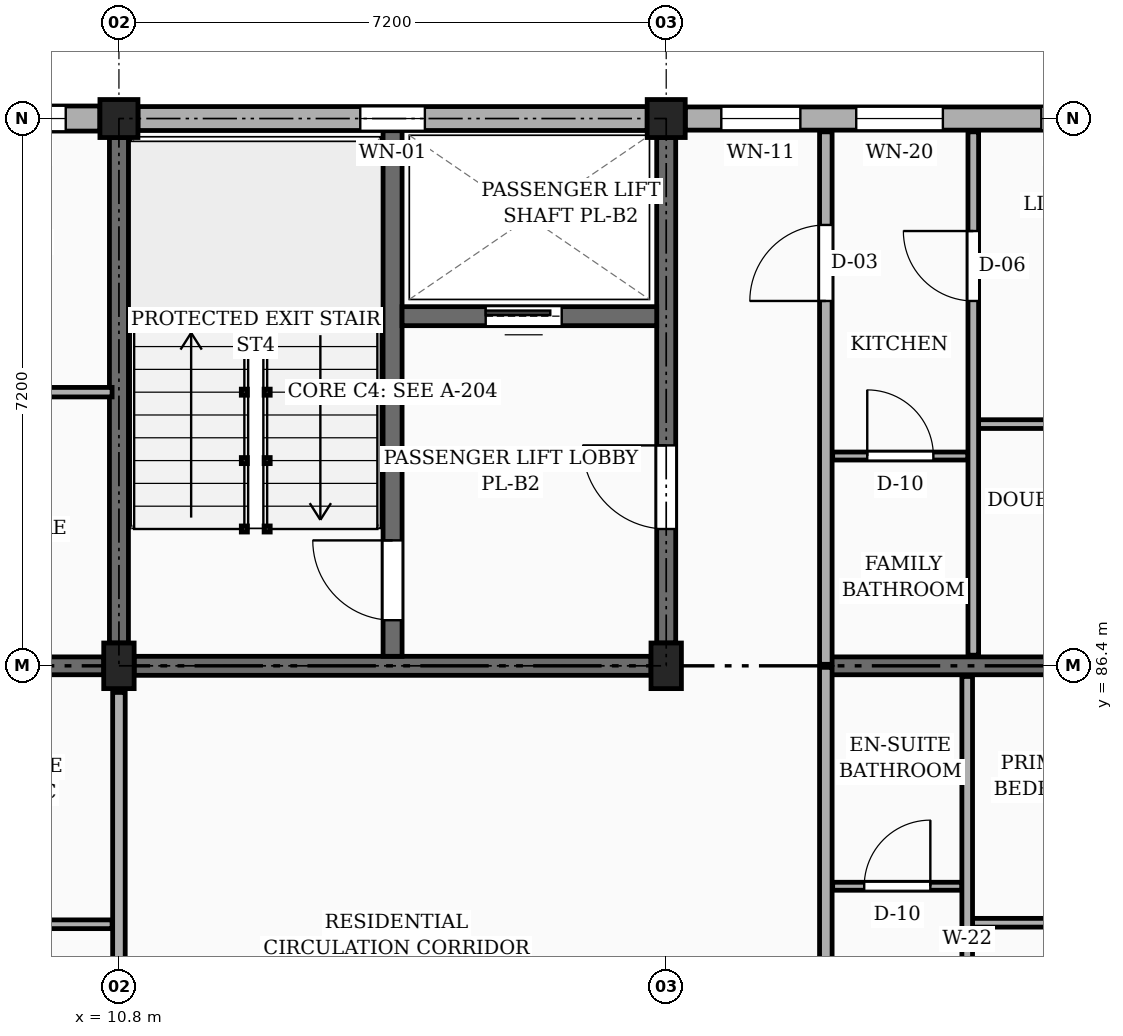
"""IFC4 building model, lengths in metres.
Left out: names, types, materials, properties, quantities, classifications, styles, units other than length and angle.
Written with IfcOpenShell. Run it as: python <this file> out.ifc"""

import sys

from ifc_helpers import new_model, si_unit, direction, frame, frame_2d, origin, origin_2d, place, context, subcontext, project, spatial, rectangle, extrude, element, fill, save


model = new_model("IFC4")
c1 = context("Model", 3, precision=1e-05, world=origin(), true_north=direction((0.0, 1.0)))
c2 = subcontext(c1, "Body", "Model", "MODEL_VIEW")
j1 = project(units=[si_unit("LENGTHUNIT", "METRE"), si_unit("PLANEANGLEUNIT", "RADIAN")], contexts=[c1])
p1 = place(None, origin())
s1 = spatial("IfcSite", under=j1, at=p1, CompositionType="ELEMENT")
p2 = place(p1, origin())
s2 = spatial("IfcBuilding", under=s1, at=p2, CompositionType="ELEMENT")
p3 = place(p2, frame((0.0, 0.0, 23.4)))
s3 = spatial("IfcBuildingStorey", under=s2, at=p3, CompositionType="ELEMENT", Elevation=23.4)
p4 = place(p3, frame((10.8, 86.4, 0.0), z_axis=(0.0, 0.0, 1.0), x_axis=(1.0, 0.0, 0.0)))
e1 = element("IfcColumn", 1, at=p4, inside=s3, PredefinedType="COLUMN", context=c2, shape_type="SweptSolid", body=[
    extrude(rectangle(XDim=0.4, YDim=0.6, at=origin_2d()), origin(), (0.0, 0.0, 1.0), 3.15),
])
p5 = place(p3, frame((10.8, 93.6, 0.0), z_axis=(0.0, 0.0, 1.0), x_axis=(1.0, 0.0, 0.0)))
e2 = element("IfcColumn", 2, at=p5, inside=s3, PredefinedType="COLUMN", context=c2, shape_type="SweptSolid", body=[
    extrude(rectangle(XDim=0.5, YDim=0.5, at=origin_2d()), origin(), (0.0, 0.0, 1.0), 3.15),
])
p6 = place(p3, frame((18.0, 86.4, 0.0), z_axis=(0.0, 0.0, 1.0), x_axis=(1.0, 0.0, 0.0)))
e3 = element("IfcColumn", 3, at=p6, inside=s3, PredefinedType="COLUMN", context=c2, shape_type="SweptSolid", body=[
    extrude(rectangle(XDim=0.4, YDim=0.6, at=origin_2d()), origin(), (0.0, 0.0, 1.0), 3.15),
])
p7 = place(p3, frame((18.0, 93.6, 0.0), z_axis=(0.0, 0.0, 1.0), x_axis=(1.0, 0.0, 0.0)))
e4 = element("IfcColumn", 4, at=p7, inside=s3, PredefinedType="COLUMN", context=c2, shape_type="SweptSolid", body=[
    extrude(rectangle(XDim=0.5, YDim=0.5, at=origin_2d()), origin(), (0.0, 0.0, 1.0), 3.15),
])
p8 = place(p3, frame((3.85, 86.4, 0.0), z_axis=(0.0, 0.0, 1.0), x_axis=(1.0, 0.0, 0.0)))
e5 = element("IfcWall", 5, at=p8, inside=s3, PredefinedType="SOLIDWALL", context=c2, shape_type="SweptSolid", body=[
    extrude(rectangle(XDim=6.75, YDim=0.235, at=frame_2d((3.375, 0.0))), origin(), (0.0, 0.0, 1.0), 2.21),
])
p9 = place(p8, frame((1.35, 0.0, 0.0)))
e6 = element("IfcOpeningElement", 6, at=p9, cuts=e5, PredefinedType="OPENING", context=c2, shape_type="SweptSolid", body=[
    extrude(rectangle(XDim=0.98, YDim=2.12, at=frame_2d((0.49, 1.06))), frame((0.0, 0.127, 0.0), z_axis=(0.0, -1.0, 0.0), x_axis=(1.0, 0.0, 0.0)), (0.0, 0.0, 1.0), 0.255),
])
p10 = place(p3, frame((20.1, 86.4, 0.0), z_axis=(0.0, 0.0, 1.0), x_axis=(1.0, 0.0, 0.0)))
e7 = element("IfcWall", 7, at=p10, inside=s3, PredefinedType="SOLIDWALL", context=c2, shape_type="SweptSolid", body=[
    extrude(rectangle(XDim=4.85, YDim=0.235, at=frame_2d((2.425, 0.0))), origin(), (0.0, 0.0, 1.0), 2.21),
])
p11 = place(p3, frame((24.95, 93.6, 0.0), z_axis=(0.0, 0.0, 1.0), x_axis=(-1.0, 0.0, 0.0)))
e8 = element("IfcWall", 8, at=p11, inside=s3, PredefinedType="SOLIDWALL", context=c2, shape_type="SweptSolid", body=[
    extrude(rectangle(XDim=6.7, YDim=0.305, at=frame_2d((3.35, 0.0))), origin(), (0.0, 0.0, 1.0), 2.48),
])
p12 = place(p11, frame((1.035, 0.0, 0.78)))
e9 = element("IfcOpeningElement", 9, at=p12, cuts=e8, PredefinedType="OPENING", context=c2, shape_type="SweptSolid", body=[
    extrude(rectangle(XDim=0.98, YDim=1.36, at=frame_2d((0.49, 0.68))), frame((0.0, 0.163, 0.0), z_axis=(0.0, -1.0, 0.0), x_axis=(1.0, 0.0, 0.0)), (0.0, 0.0, 1.0), 0.325),
])
p13 = place(p11, frame((3.31, 0.0, 0.78)))
e10 = element("IfcOpeningElement", 10, at=p13, cuts=e8, PredefinedType="OPENING", context=c2, shape_type="SweptSolid", body=[
    extrude(rectangle(XDim=1.14, YDim=1.36, at=frame_2d((0.57, 0.68))), frame((0.0, 0.163, 0.0), z_axis=(0.0, -1.0, 0.0), x_axis=(1.0, 0.0, 0.0)), (0.0, 0.0, 1.0), 0.325),
])
p14 = place(p11, frame((5.185, 0.0, 0.78)))
e11 = element("IfcOpeningElement", 11, at=p14, cuts=e8, PredefinedType="OPENING", context=c2, shape_type="SweptSolid", body=[
    extrude(rectangle(XDim=1.04, YDim=1.26, at=frame_2d((0.52, 0.63))), frame((0.0, 0.163, 0.0), z_axis=(0.0, -1.0, 0.0), x_axis=(1.0, 0.0, 0.0)), (0.0, 0.0, 1.0), 0.325),
])
p15 = place(p3, frame((17.75, 93.6, 0.0), z_axis=(0.0, 0.0, 1.0), x_axis=(-1.0, 0.0, 0.0)))
e12 = element("IfcWall", 12, at=p15, inside=s3, PredefinedType="SOLIDWALL", context=c2, shape_type="SweptSolid", body=[
    extrude(rectangle(XDim=6.7, YDim=0.315, at=frame_2d((3.35, 0.0))), origin(), (0.0, 0.0, 1.0), 2.48),
])
p16 = place(p15, frame((2.925, 0.0, 0.9)))
e13 = element("IfcOpeningElement", 13, at=p16, cuts=e12, PredefinedType="OPENING", context=c2, shape_type="SweptSolid", body=[
    extrude(rectangle(XDim=0.85, YDim=1.15, at=frame_2d((0.425, 0.575))), frame((0.0, 0.167, 0.0), z_axis=(0.0, -1.0, 0.0), x_axis=(1.0, 0.0, 0.0)), (0.0, 0.0, 1.0), 0.335),
])
p17 = place(p3, frame((10.55, 93.6, 0.0), z_axis=(0.0, 0.0, 1.0), x_axis=(-1.0, 0.0, 0.0)))
e14 = element("IfcWall", 14, at=p17, inside=s3, PredefinedType="SOLIDWALL", context=c2, shape_type="SweptSolid", body=[
    extrude(rectangle(XDim=6.7, YDim=0.33, at=frame_2d((3.35, 0.0))), origin(), (0.0, 0.0, 1.0), 2.48),
])
p18 = place(p17, frame((0.45, 0.0, 0.78)))
e15 = element("IfcOpeningElement", 15, at=p18, cuts=e14, PredefinedType="OPENING", context=c2, shape_type="SweptSolid", body=[
    extrude(rectangle(XDim=1.3, YDim=1.36, at=frame_2d((0.65, 0.68))), frame((0.0, 0.175, 0.0), z_axis=(0.0, -1.0, 0.0), x_axis=(1.0, 0.0, 0.0)), (0.0, 0.0, 1.0), 0.35),
])
p19 = place(p17, frame((4.65, 0.0, 0.78)))
e16 = element("IfcOpeningElement", 16, at=p19, cuts=e14, PredefinedType="OPENING", context=c2, shape_type="SweptSolid", body=[
    extrude(rectangle(XDim=1.46, YDim=1.36, at=frame_2d((0.73, 0.68))), frame((0.0, 0.175, 0.0), z_axis=(0.0, -1.0, 0.0), x_axis=(1.0, 0.0, 0.0)), (0.0, 0.0, 1.0), 0.35),
])
p20 = place(p3, frame((10.8, 86.7, 0.0), z_axis=(0.0, 0.0, 1.0), x_axis=(0.0, 1.0, 0.0)))
e17 = element("IfcWall", 17, at=p20, inside=s3, PredefinedType="SHEAR", context=c2, shape_type="SweptSolid", body=[
    extrude(rectangle(XDim=6.65, YDim=0.25, at=frame_2d((3.325, 0.0))), origin(), (0.0, 0.0, 1.0), 2.91),
])
p21 = place(p3, frame((18.0, 86.7, 0.0), z_axis=(0.0, 0.0, 1.0), x_axis=(0.0, 1.0, 0.0)))
e18 = element("IfcWall", 18, at=p21, inside=s3, PredefinedType="SHEAR", context=c2, shape_type="SweptSolid", body=[
    extrude(rectangle(XDim=6.65, YDim=0.25, at=frame_2d((3.325, 0.0))), origin(), (0.0, 0.0, 1.0), 2.91),
])
p22 = place(p21, frame((1.5, 0.0, 0.0)))
e19 = element("IfcOpeningElement", 19, at=p22, cuts=e18, PredefinedType="OPENING", context=c2, shape_type="SweptSolid", body=[
    extrude(rectangle(XDim=1.1, YDim=2.15, at=frame_2d((0.55, 1.075))), frame((0.0, 0.135, 0.0), z_axis=(0.0, -1.0, 0.0), x_axis=(1.0, 0.0, 0.0)), (0.0, 0.0, 1.0), 0.27),
])
p23 = place(p3, frame((11.0, 86.4, 0.0), z_axis=(0.0, 0.0, 1.0), x_axis=(1.0, 0.0, 0.0)))
e20 = element("IfcWall", 20, at=p23, inside=s3, PredefinedType="SHEAR", context=c2, shape_type="SweptSolid", body=[
    extrude(rectangle(XDim=6.8, YDim=0.25, at=frame_2d((3.4, 0.0))), origin(), (0.0, 0.0, 1.0), 2.91),
])
p24 = place(p3, frame((14.4, 86.525, 0.0), z_axis=(0.0, 0.0, 1.0), x_axis=(0.0, 1.0, 0.0)))
e21 = element("IfcWall", 21, at=p24, inside=s3, PredefinedType="SHEAR", context=c2, shape_type="SweptSolid", body=[
    extrude(rectangle(XDim=6.915, YDim=0.25, at=frame_2d((3.458, 0.0))), origin(), (0.0, 0.0, 1.0), 2.91),
])
p25 = place(p24, frame((0.475, 0.0, 0.0)))
e22 = element("IfcOpeningElement", 22, at=p25, cuts=e21, PredefinedType="OPENING", context=c2, shape_type="SweptSolid", body=[
    extrude(rectangle(XDim=1.05, YDim=2.15, at=frame_2d((0.525, 1.075))), frame((0.0, 0.135, 0.0), z_axis=(0.0, -1.0, 0.0), x_axis=(1.0, 0.0, 0.0)), (0.0, 0.0, 1.0), 0.27),
])
p26 = place(p3, frame((14.525, 91.0, 0.0), z_axis=(0.0, 0.0, 1.0), x_axis=(1.0, 0.0, 0.0)))
e23 = element("IfcWall", 23, at=p26, inside=s3, PredefinedType="SHEAR", context=c2, shape_type="SweptSolid", body=[
    extrude(rectangle(XDim=3.35, YDim=0.25, at=frame_2d((1.675, 0.0))), origin(), (0.0, 0.0, 1.0), 2.91),
])
p27 = place(p26, frame((1.1, 0.0, 0.0)))
e24 = element("IfcOpeningElement", 24, at=p27, cuts=e23, PredefinedType="OPENING", context=c2, shape_type="SweptSolid", body=[
    extrude(rectangle(XDim=1.0, YDim=2.2, at=frame_2d((0.5, 1.1))), frame((0.0, 0.135, 0.0), z_axis=(0.0, -1.0, 0.0), x_axis=(1.0, 0.0, 0.0)), (0.0, 0.0, 1.0), 0.27),
])
p28 = place(p3, frame((20.1, 79.22, 0.0), z_axis=(0.0, 0.0, 1.0), x_axis=(0.0, 1.0, 0.0)))
e25 = element("IfcWall", 25, at=p28, inside=s3, PredefinedType="PARTITIONING", context=c2, shape_type="SweptSolid", body=[
    extrude(rectangle(XDim=7.16, YDim=0.165, at=frame_2d((3.58, 0.0))), origin(), (0.0, 0.0, 1.0), 2.345),
])
p29 = place(p28, frame((1.33, 0.0, 0.0)))
e26 = element("IfcOpeningElement", 26, at=p29, cuts=e25, PredefinedType="OPENING", context=c2, shape_type="SweptSolid", body=[
    extrude(rectangle(XDim=1.14, YDim=2.18, at=frame_2d((0.57, 1.09))), frame((0.0, 0.093, 0.0), z_axis=(0.0, -1.0, 0.0), x_axis=(1.0, 0.0, 0.0)), (0.0, 0.0, 1.0), 0.185),
])
p30 = place(p3, frame((20.1, 86.42, 0.0), z_axis=(0.0, 0.0, 1.0), x_axis=(0.0, 1.0, 0.0)))
e27 = element("IfcWall", 27, at=p30, inside=s3, PredefinedType="PARTITIONING", context=c2, shape_type="SweptSolid", body=[
    extrude(rectangle(XDim=7.005, YDim=0.165, at=frame_2d((3.502, 0.0))), origin(), (0.0, 0.0, 1.0), 2.345),
])
p31 = place(p30, frame((4.78, 0.0, 0.0)))
e28 = element("IfcOpeningElement", 28, at=p31, cuts=e27, PredefinedType="OPENING", context=c2, shape_type="SweptSolid", body=[
    extrude(rectangle(XDim=1.0, YDim=2.15, at=frame_2d((0.5, 1.075))), frame((0.0, 0.093, 0.0), z_axis=(0.0, -1.0, 0.0), x_axis=(1.0, 0.0, 0.0)), (0.0, 0.0, 1.0), 0.185),
])
p32 = place(p3, frame((10.8, 79.55, 0.0), z_axis=(0.0, 0.0, 1.0), x_axis=(0.0, 1.0, 0.0)))
e29 = element("IfcWall", 29, at=p32, inside=s3, PredefinedType="PARTITIONING", context=c2, shape_type="SweptSolid", body=[
    extrude(rectangle(XDim=6.5, YDim=0.165, at=frame_2d((3.25, 0.0))), origin(), (0.0, 0.0, 1.0), 2.345),
])
p33 = place(p32, frame((1.1, 0.0, 0.0)))
e30 = element("IfcOpeningElement", 30, at=p33, cuts=e29, PredefinedType="OPENING", context=c2, shape_type="SweptSolid", body=[
    extrude(rectangle(XDim=1.14, YDim=2.18, at=frame_2d((0.57, 1.09))), frame((0.0, 0.093, 0.0), z_axis=(0.0, -1.0, 0.0), x_axis=(1.0, 0.0, 0.0)), (0.0, 0.0, 1.0), 0.185),
])
p34 = place(p3, frame((3.775, 83.0, 0.0), z_axis=(0.0, 0.0, 1.0), x_axis=(1.0, 0.0, 0.0)))
e31 = element("IfcWall", 31, at=p34, inside=s3, PredefinedType="PARTITIONING", context=c2, shape_type="SweptSolid", body=[
    extrude(rectangle(XDim=6.935, YDim=0.115, at=frame_2d((3.468, 0.0))), origin(), (0.0, 0.0, 1.0), 2.345),
])
p35 = place(p34, frame((4.6, 0.0, 0.0)))
e32 = element("IfcOpeningElement", 32, at=p35, cuts=e31, PredefinedType="OPENING", context=c2, shape_type="SweptSolid", body=[
    extrude(rectangle(XDim=0.87, YDim=2.05, at=frame_2d((0.435, 1.025))), frame((0.0, 0.067, 0.0), z_axis=(0.0, -1.0, 0.0), x_axis=(1.0, 0.0, 0.0)), (0.0, 0.0, 1.0), 0.135),
])
p36 = place(p34, frame((1.2, 0.0, 0.0)))
e33 = element("IfcOpeningElement", 33, at=p36, cuts=e31, PredefinedType="OPENING", context=c2, shape_type="SweptSolid", body=[
    extrude(rectangle(XDim=0.92, YDim=2.1, at=frame_2d((0.46, 1.05))), frame((0.0, 0.067, 0.0), z_axis=(0.0, -1.0, 0.0), x_axis=(1.0, 0.0, 0.0)), (0.0, 0.0, 1.0), 0.135),
])
p37 = place(p3, frame((22.03, 83.02, 0.0), z_axis=(0.0, 0.0, 1.0), x_axis=(1.0, 0.0, 0.0)))
e34 = element("IfcWall", 34, at=p37, inside=s3, PredefinedType="PARTITIONING", context=c2, shape_type="SweptSolid", body=[
    extrude(rectangle(XDim=2.995, YDim=0.115, at=frame_2d((1.498, 0.0))), origin(), (0.0, 0.0, 1.0), 2.345),
])
p38 = place(p37, frame((1.048, 0.0, 0.0)))
e35 = element("IfcOpeningElement", 35, at=p38, cuts=e34, PredefinedType="OPENING", context=c2, shape_type="SweptSolid", body=[
    extrude(rectangle(XDim=0.9, YDim=2.1, at=frame_2d((0.45, 1.05))), frame((0.0, 0.067, 0.0), z_axis=(0.0, -1.0, 0.0), x_axis=(1.0, 0.0, 0.0)), (0.0, 0.0, 1.0), 0.135),
])
p39 = place(p3, frame((20.19, 83.5, 0.0), z_axis=(0.0, 0.0, 1.0), x_axis=(1.0, 0.0, 0.0)))
e36 = element("IfcWall", 36, at=p39, inside=s3, PredefinedType="PARTITIONING", context=c2, shape_type="SweptSolid", body=[
    extrude(rectangle(XDim=1.7, YDim=0.105, at=frame_2d((0.85, 0.0))), origin(), (0.0, 0.0, 1.0), 2.345),
])
p40 = place(p39, frame((0.415, 0.0, 0.0)))
e37 = element("IfcOpeningElement", 37, at=p40, cuts=e36, PredefinedType="OPENING", context=c2, shape_type="SweptSolid", body=[
    extrude(rectangle(XDim=0.87, YDim=2.05, at=frame_2d((0.435, 1.025))), frame((0.0, 0.062, 0.0), z_axis=(0.0, -1.0, 0.0), x_axis=(1.0, 0.0, 0.0)), (0.0, 0.0, 1.0), 0.125),
])
p41 = place(p3, frame((21.96, 79.34, 0.0), z_axis=(0.0, 0.0, 1.0), x_axis=(0.0, 1.0, 0.0)))
e38 = element("IfcWall", 38, at=p41, inside=s3, PredefinedType="PARTITIONING", context=c2, shape_type="SweptSolid", body=[
    extrude(rectangle(XDim=6.92, YDim=0.14, at=frame_2d((3.46, 0.0))), origin(), (0.0, 0.0, 1.0), 2.345),
])
p42 = place(p41, frame((1.31, 0.0, 0.0)))
e39 = element("IfcOpeningElement", 39, at=p42, cuts=e38, PredefinedType="OPENING", context=c2, shape_type="SweptSolid", body=[
    extrude(rectangle(XDim=0.95, YDim=2.1, at=frame_2d((0.475, 1.05))), frame((0.0, 0.08, 0.0), z_axis=(0.0, -1.0, 0.0), x_axis=(1.0, 0.0, 0.0)), (0.0, 0.0, 1.0), 0.16),
])
p43 = place(p3, frame((3.775, 90.0, 0.0), z_axis=(0.0, 0.0, 1.0), x_axis=(1.0, 0.0, 0.0)))
e40 = element("IfcWall", 40, at=p43, inside=s3, PredefinedType="PARTITIONING", context=c2, shape_type="SweptSolid", body=[
    extrude(rectangle(XDim=6.935, YDim=0.125, at=frame_2d((3.468, 0.0))), origin(), (0.0, 0.0, 1.0), 2.345),
])
p44 = place(p43, frame((2.6, 0.0, 0.0)))
e41 = element("IfcOpeningElement", 41, at=p44, cuts=e40, PredefinedType="OPENING", context=c2, shape_type="SweptSolid", body=[
    extrude(rectangle(XDim=0.92, YDim=2.1, at=frame_2d((0.46, 1.05))), frame((0.0, 0.073, 0.0), z_axis=(0.0, -1.0, 0.0), x_axis=(1.0, 0.0, 0.0)), (0.0, 0.0, 1.0), 0.145),
])
p45 = place(p3, frame((22.11, 89.58, 0.0), z_axis=(0.0, 0.0, 1.0), x_axis=(1.0, 0.0, 0.0)))
e42 = element("IfcWall", 42, at=p45, inside=s3, PredefinedType="PARTITIONING", context=c2, shape_type="SweptSolid", body=[
    extrude(rectangle(XDim=2.915, YDim=0.115, at=frame_2d((1.458, 0.0))), origin(), (0.0, 0.0, 1.0), 2.345),
])
p46 = place(p45, frame((1.018, 0.0, 0.0)))
e43 = element("IfcOpeningElement", 43, at=p46, cuts=e42, PredefinedType="OPENING", context=c2, shape_type="SweptSolid", body=[
    extrude(rectangle(XDim=0.88, YDim=2.08, at=frame_2d((0.44, 1.04))), frame((0.0, 0.067, 0.0), z_axis=(0.0, -1.0, 0.0), x_axis=(1.0, 0.0, 0.0)), (0.0, 0.0, 1.0), 0.135),
])
p47 = place(p3, frame((20.19, 89.16, 0.0), z_axis=(0.0, 0.0, 1.0), x_axis=(1.0, 0.0, 0.0)))
e44 = element("IfcWall", 44, at=p47, inside=s3, PredefinedType="PARTITIONING", context=c2, shape_type="SweptSolid", body=[
    extrude(rectangle(XDim=1.78, YDim=0.105, at=frame_2d((0.89, 0.0))), origin(), (0.0, 0.0, 1.0), 2.345),
])
p48 = place(p47, frame((0.455, 0.0, 0.0)))
e45 = element("IfcOpeningElement", 45, at=p48, cuts=e44, PredefinedType="OPENING", context=c2, shape_type="SweptSolid", body=[
    extrude(rectangle(XDim=0.87, YDim=2.05, at=frame_2d((0.435, 1.025))), frame((0.0, 0.062, 0.0), z_axis=(0.0, -1.0, 0.0), x_axis=(1.0, 0.0, 0.0)), (0.0, 0.0, 1.0), 0.125),
])
p49 = place(p3, frame((22.04, 86.54, 0.0), z_axis=(0.0, 0.0, 1.0), x_axis=(0.0, 1.0, 0.0)))
e46 = element("IfcWall", 46, at=p49, inside=s3, PredefinedType="PARTITIONING", context=c2, shape_type="SweptSolid", body=[
    extrude(rectangle(XDim=6.885, YDim=0.14, at=frame_2d((3.442, 0.0))), origin(), (0.0, 0.0, 1.0), 2.345),
])
p50 = place(p49, frame((4.66, 0.0, 0.0)))
e47 = element("IfcOpeningElement", 47, at=p50, cuts=e46, PredefinedType="OPENING", context=c2, shape_type="SweptSolid", body=[
    extrude(rectangle(XDim=0.92, YDim=2.1, at=frame_2d((0.46, 1.05))), frame((0.0, 0.08, 0.0), z_axis=(0.0, -1.0, 0.0), x_axis=(1.0, 0.0, 0.0)), (0.0, 0.0, 1.0), 0.16),
])
p51 = place(p12, origin())
e48 = element("IfcWindow", 48, at=p51, inside=s3, PartitioningType="SINGLE_PANEL", PredefinedType="WINDOW", context=c2, shape_type="SweptSolid", body=[
    extrude(rectangle(XDim=0.98, YDim=1.36, at=frame_2d((0.49, 0.68))), frame((0.0, 0.03, 0.0), z_axis=(0.0, -1.0, 0.0), x_axis=(1.0, 0.0, 0.0)), (0.0, 0.0, 1.0), 0.06),
])
fill(e9, e48)
p52 = place(p13, origin())
e49 = element("IfcWindow", 49, at=p52, inside=s3, PartitioningType="SINGLE_PANEL", PredefinedType="WINDOW", context=c2, shape_type="SweptSolid", body=[
    extrude(rectangle(XDim=1.14, YDim=1.36, at=frame_2d((0.57, 0.68))), frame((0.0, 0.03, 0.0), z_axis=(0.0, -1.0, 0.0), x_axis=(1.0, 0.0, 0.0)), (0.0, 0.0, 1.0), 0.06),
])
fill(e10, e49)
p53 = place(p14, origin())
e50 = element("IfcWindow", 50, at=p53, inside=s3, PartitioningType="SINGLE_PANEL", PredefinedType="WINDOW", context=c2, shape_type="SweptSolid", body=[
    extrude(rectangle(XDim=1.04, YDim=1.26, at=frame_2d((0.52, 0.63))), frame((0.0, 0.03, 0.0), z_axis=(0.0, -1.0, 0.0), x_axis=(1.0, 0.0, 0.0)), (0.0, 0.0, 1.0), 0.06),
])
fill(e11, e50)
p54 = place(p16, origin())
e51 = element("IfcWindow", 51, at=p54, inside=s3, PartitioningType="SINGLE_PANEL", PredefinedType="WINDOW", context=c2, shape_type="SweptSolid", body=[
    extrude(rectangle(XDim=0.85, YDim=1.15, at=frame_2d((0.425, 0.575))), frame((0.0, 0.03, 0.0), z_axis=(0.0, -1.0, 0.0), x_axis=(1.0, 0.0, 0.0)), (0.0, 0.0, 1.0), 0.06),
])
fill(e13, e51)
p55 = place(p18, origin())
e52 = element("IfcWindow", 52, at=p55, inside=s3, PartitioningType="SINGLE_PANEL", PredefinedType="WINDOW", context=c2, shape_type="SweptSolid", body=[
    extrude(rectangle(XDim=1.3, YDim=1.36, at=frame_2d((0.65, 0.68))), frame((0.0, 0.03, 0.0), z_axis=(0.0, -1.0, 0.0), x_axis=(1.0, 0.0, 0.0)), (0.0, 0.0, 1.0), 0.06),
])
fill(e15, e52)
p56 = place(p22, frame((1.1, 0.0, 0.0), z_axis=(0.0, 0.0, 1.0), x_axis=(-1.0, 0.0, 0.0)))
e53 = element("IfcDoor", 53, at=p56, inside=s3, OperationType="SINGLE_SWING_RIGHT", PredefinedType="DOOR", context=c2, shape_type="SweptSolid", body=[
    extrude(rectangle(XDim=1.1, YDim=2.15, at=frame_2d((0.55, 1.075))), frame((0.0, 0.025, 0.0), z_axis=(0.0, -1.0, 0.0), x_axis=(1.0, 0.0, 0.0)), (0.0, 0.0, 1.0), 0.05),
])
fill(e19, e53)
p57 = place(p25, origin())
e54 = element("IfcDoor", 54, at=p57, inside=s3, OperationType="SINGLE_SWING_RIGHT", PredefinedType="DOOR", context=c2, shape_type="SweptSolid", body=[
    extrude(rectangle(XDim=1.05, YDim=2.15, at=frame_2d((0.525, 1.075))), frame((0.0, 0.025, 0.0), z_axis=(0.0, -1.0, 0.0), x_axis=(1.0, 0.0, 0.0)), (0.0, 0.0, 1.0), 0.05),
])
fill(e22, e54)
p58 = place(p27, origin())
e55 = element("IfcDoor", 55, at=p58, inside=s3, OperationType="SLIDING_TO_LEFT", PredefinedType="DOOR", context=c2, shape_type="SweptSolid", body=[
    extrude(rectangle(XDim=1.0, YDim=2.2, at=frame_2d((0.5, 1.1))), frame((0.0, 0.025, 0.0), z_axis=(0.0, -1.0, 0.0), x_axis=(1.0, 0.0, 0.0)), (0.0, 0.0, 1.0), 0.05),
])
fill(e24, e55)
p59 = place(p31, origin())
e56 = element("IfcDoor", 56, at=p59, inside=s3, OperationType="SINGLE_SWING_LEFT", PredefinedType="DOOR", context=c2, shape_type="SweptSolid", body=[
    extrude(rectangle(XDim=1.0, YDim=2.15, at=frame_2d((0.5, 1.075))), frame((0.0, 0.025, 0.0), z_axis=(0.0, -1.0, 0.0), x_axis=(1.0, 0.0, 0.0)), (0.0, 0.0, 1.0), 0.05),
])
fill(e28, e56)
p60 = place(p40, origin())
e57 = element("IfcDoor", 57, at=p60, inside=s3, OperationType="SINGLE_SWING_RIGHT", PredefinedType="DOOR", context=c2, shape_type="SweptSolid", body=[
    extrude(rectangle(XDim=0.87, YDim=2.05, at=frame_2d((0.435, 1.025))), frame((0.0, 0.025, 0.0), z_axis=(0.0, -1.0, 0.0), x_axis=(1.0, 0.0, 0.0)), (0.0, 0.0, 1.0), 0.05),
])
fill(e37, e57)
p61 = place(p48, origin())
e58 = element("IfcDoor", 58, at=p61, inside=s3, OperationType="SINGLE_SWING_LEFT", PredefinedType="DOOR", context=c2, shape_type="SweptSolid", body=[
    extrude(rectangle(XDim=0.87, YDim=2.05, at=frame_2d((0.435, 1.025))), frame((0.0, 0.025, 0.0), z_axis=(0.0, -1.0, 0.0), x_axis=(1.0, 0.0, 0.0)), (0.0, 0.0, 1.0), 0.05),
])
fill(e45, e58)
p62 = place(p50, origin())
e59 = element("IfcDoor", 59, at=p62, inside=s3, OperationType="SINGLE_SWING_RIGHT", PredefinedType="DOOR", context=c2, shape_type="SweptSolid", body=[
    extrude(rectangle(XDim=0.92, YDim=2.1, at=frame_2d((0.46, 1.05))), frame((0.0, 0.025, 0.0), z_axis=(0.0, -1.0, 0.0), x_axis=(1.0, 0.0, 0.0)), (0.0, 0.0, 1.0), 0.05),
])
fill(e47, e59)
save(model, sys.argv[1])
